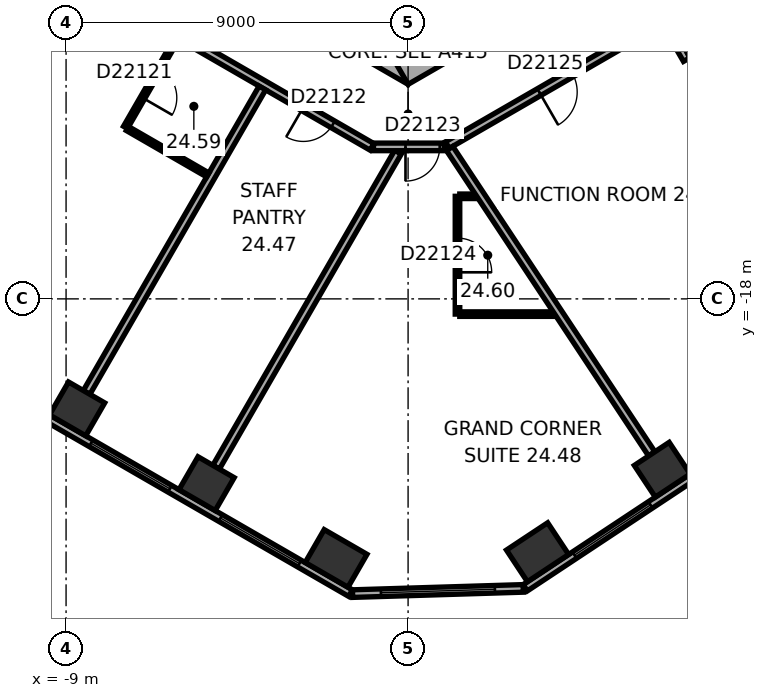
"""IFC4 building model, lengths in metres.
Left out: names, types, materials, properties, quantities, classifications, styles, units other than length and angle.
Written with IfcOpenShell. Run it as: python <this file> out.ifc"""

import sys

from ifc_helpers import new_model, si_unit, direction, frame, frame_2d, origin, origin_2d, place, context, subcontext, project, spatial, rectangle, extrude, element, fill, save


model = new_model("IFC4")
c1 = context("Model", 3, precision=1e-05, world=origin(), true_north=direction((0.0, 1.0)))
c2 = subcontext(c1, "Body", "Model", "MODEL_VIEW")
j1 = project(units=[si_unit("LENGTHUNIT", "METRE"), si_unit("PLANEANGLEUNIT", "RADIAN")], contexts=[c1])
p1 = place(None, origin())
s1 = spatial("IfcSite", under=j1, at=p1, CompositionType="ELEMENT")
p2 = place(p1, origin())
s2 = spatial("IfcBuilding", under=s1, at=p2, CompositionType="ELEMENT")
p3 = place(p2, frame((0.0, 0.0, 103.4)))
s3 = spatial("IfcBuildingStorey", under=s2, at=p3, CompositionType="ELEMENT", Elevation=103.4)
for number, where, z_axis, x_axis in (
    (1, (-8.71, -20.895, 0.0), (0.0, 0.0, 1.0), (0.866, -0.5, 0.0)),
    (2, (-5.302, -22.862, 0.0), (0.0, 0.0, 1.0), (0.866, -0.5, 0.0)),
):
    element("IfcColumn", number, at=place(p3, frame(where, z_axis=z_axis, x_axis=x_axis)), inside=s3, PredefinedType="COLUMN", context=c2, shape_type="SweptSolid", body=[
        extrude(rectangle(XDim=1.1, YDim=1.0, at=origin_2d()), origin(), (0.0, 0.0, 1.0), 3.3),
    ])
for number, where, z_axis, x_axis in (
    (3, (-1.895, -24.829, 0.0), (0.0, 0.0, 1.0), (0.866, -0.5, 0.0)),
    (4, (3.407, -24.667, 0.0), (0.0, 0.0, 1.0), (0.834, 0.552, 0.0)),
):
    element("IfcColumn", number, at=place(p3, frame(where, z_axis=z_axis, x_axis=x_axis)), inside=s3, PredefinedType="COLUMN", context=c2, shape_type="SweptSolid", body=[
        extrude(rectangle(XDim=1.3, YDim=1.0, at=origin_2d()), origin(), (0.0, 0.0, 1.0), 3.3),
    ])
p4 = place(p3, frame((6.688, -22.496, 0.0), z_axis=(0.0, 0.0, 1.0), x_axis=(0.833885822067, 0.551936985312, 0.0)))
e5 = element("IfcColumn", 5, at=p4, inside=s3, PredefinedType="COLUMN", context=c2, shape_type="SweptSolid", body=[
    extrude(rectangle(XDim=1.1, YDim=1.0, at=origin_2d()), origin(), (0.0, 0.0, 1.0), 3.3),
])
p5 = place(p3, frame((-10.4, -5.658, 0.0), z_axis=(0.0, 0.0, 1.0), x_axis=(0.866021384402, -0.500006961711, 0.0)))
e6 = element("IfcWall", 6, at=p5, inside=s3, PredefinedType="SHEAR", context=c2, shape_type="SweptSolid", body=[
    extrude(rectangle(XDim=12.355, YDim=1.2, at=frame_2d((6.178, 0.0))), origin(), (0.0, 0.0, 1.0), 3.3),
])
p6 = place(p5, frame((6.378, 0.0, 0.0)))
e7 = element("IfcOpeningElement", 7, at=p6, cuts=e6, PredefinedType="OPENING", context=c2, shape_type="SweptSolid", body=[
    extrude(rectangle(XDim=1.5, YDim=2.1, at=frame_2d((0.75, 1.05))), frame((0.0, 0.61, 0.0), z_axis=(0.0, -1.0, 0.0), x_axis=(1.0, 0.0, 0.0)), (0.0, 0.0, 1.0), 1.22),
])
p7 = place(p5, frame((1.928, 0.0, 0.0)))
e8 = element("IfcOpeningElement", 8, at=p7, cuts=e6, PredefinedType="OPENING", context=c2, shape_type="SweptSolid", body=[
    extrude(rectangle(XDim=0.9, YDim=2.1, at=frame_2d((0.45, 1.05))), frame((0.0, 0.61, 0.0), z_axis=(0.0, -1.0, 0.0), x_axis=(1.0, 0.0, 0.0)), (0.0, 0.0, 1.0), 1.22),
])
p8 = place(p5, frame((4.528, 0.0, 0.0)))
e9 = element("IfcOpeningElement", 9, at=p8, cuts=e6, PredefinedType="OPENING", context=c2, shape_type="SweptSolid", body=[
    extrude(rectangle(XDim=0.9, YDim=2.1, at=frame_2d((0.45, 1.05))), frame((0.0, 0.61, 0.0), z_axis=(0.0, -1.0, 0.0), x_axis=(1.0, 0.0, 0.0)), (0.0, 0.0, 1.0), 1.22),
])
p9 = place(p3, frame((-0.3, -11.836, 0.0), z_axis=(0.0, 0.0, 1.0), x_axis=(0.866021384402, 0.500006961711, 0.0)))
e10 = element("IfcWall", 10, at=p9, inside=s3, PredefinedType="SHEAR", context=c2, shape_type="SweptSolid", body=[
    extrude(rectangle(XDim=12.355, YDim=1.2, at=frame_2d((6.178, 0.0))), origin(), (0.0, 0.0, 1.0), 3.3),
])
p10 = place(p9, frame((4.128, 0.0, 0.0)))
e11 = element("IfcOpeningElement", 11, at=p10, cuts=e10, PredefinedType="OPENING", context=c2, shape_type="SweptSolid", body=[
    extrude(rectangle(XDim=0.9, YDim=2.1, at=frame_2d((0.45, 1.05))), frame((0.0, 0.61, 0.0), z_axis=(0.0, -1.0, 0.0), x_axis=(1.0, 0.0, 0.0)), (0.0, 0.0, 1.0), 1.22),
])
p11 = place(p9, frame((7.928, 0.0, 0.0)))
e12 = element("IfcOpeningElement", 12, at=p11, cuts=e10, PredefinedType="OPENING", context=c2, shape_type="SweptSolid", body=[
    extrude(rectangle(XDim=1.1, YDim=2.1, at=frame_2d((0.55, 1.05))), frame((0.0, 0.61, 0.0), z_axis=(0.0, -1.0, 0.0), x_axis=(1.0, 0.0, 0.0)), (0.0, 0.0, 1.0), 1.22),
])
p12 = place(p3, frame((-19.914, -15.119, 0.0), z_axis=(0.0, 0.0, 1.0), x_axis=(0.866025418898, -0.499999973822, 0.0)))
e13 = element("IfcWall", 13, at=p12, inside=s3, PredefinedType="STANDARD", context=c2, shape_type="SweptSolid", body=[
    extrude(rectangle(XDim=21.246, YDim=0.2, at=frame_2d((10.623, 0.0))), origin(), (0.0, 0.0, 1.0), 3.3),
])
p13 = place(p12, frame((1.555, 0.0, 0.8)))
e14 = element("IfcOpeningElement", 14, at=p13, cuts=e13, PredefinedType="OPENING", context=c2, shape_type="SweptSolid", body=[
    extrude(rectangle(XDim=2.4, YDim=1.7, at=frame_2d((1.2, 0.85))), frame((0.0, 0.11, 0.0), z_axis=(0.0, -1.0, 0.0), x_axis=(1.0, 0.0, 0.0)), (0.0, 0.0, 1.0), 0.22),
])
p14 = place(p12, frame((5.489, 0.0, 0.8)))
e15 = element("IfcOpeningElement", 15, at=p14, cuts=e13, PredefinedType="OPENING", context=c2, shape_type="SweptSolid", body=[
    extrude(rectangle(XDim=2.4, YDim=1.7, at=frame_2d((1.2, 0.85))), frame((0.0, 0.11, 0.0), z_axis=(0.0, -1.0, 0.0), x_axis=(1.0, 0.0, 0.0)), (0.0, 0.0, 1.0), 0.22),
])
p15 = place(p12, frame((9.424, 0.0, 0.8)))
e16 = element("IfcOpeningElement", 16, at=p15, cuts=e13, PredefinedType="OPENING", context=c2, shape_type="SweptSolid", body=[
    extrude(rectangle(XDim=2.4, YDim=1.7, at=frame_2d((1.2, 0.85))), frame((0.0, 0.11, 0.0), z_axis=(0.0, -1.0, 0.0), x_axis=(1.0, 0.0, 0.0)), (0.0, 0.0, 1.0), 0.22),
])
p16 = place(p12, frame((13.358, 0.0, 0.8)))
e17 = element("IfcOpeningElement", 17, at=p16, cuts=e13, PredefinedType="OPENING", context=c2, shape_type="SweptSolid", body=[
    extrude(rectangle(XDim=2.4, YDim=1.7, at=frame_2d((1.2, 0.85))), frame((0.0, 0.11, 0.0), z_axis=(0.0, -1.0, 0.0), x_axis=(1.0, 0.0, 0.0)), (0.0, 0.0, 1.0), 0.22),
])
p17 = place(p12, frame((17.293, 0.0, 0.8)))
e18 = element("IfcOpeningElement", 18, at=p17, cuts=e13, PredefinedType="OPENING", context=c2, shape_type="SweptSolid", body=[
    extrude(rectangle(XDim=2.4, YDim=1.7, at=frame_2d((1.2, 0.85))), frame((0.0, 0.11, 0.0), z_axis=(0.0, -1.0, 0.0), x_axis=(1.0, 0.0, 0.0)), (0.0, 0.0, 1.0), 0.22),
])
p18 = place(p3, frame((-1.461, -25.755, 0.0), z_axis=(0.0, 0.0, 1.0), x_axis=(0.999533823446, 0.030530898895, 0.0)))
e19 = element("IfcWall", 19, at=p18, inside=s3, PredefinedType="STANDARD", context=c2, shape_type="SweptSolid", body=[
    extrude(rectangle(XDim=4.494, YDim=0.2, at=frame_2d((2.247, 0.0))), origin(), (0.0, 0.0, 1.0), 3.3),
])
p19 = place(p18, frame((0.747, 0.0, 0.8)))
e20 = element("IfcOpeningElement", 20, at=p19, cuts=e19, PredefinedType="OPENING", context=c2, shape_type="SweptSolid", body=[
    extrude(rectangle(XDim=3.0, YDim=1.7, at=frame_2d((1.5, 0.85))), frame((0.0, 0.11, 0.0), z_axis=(0.0, -1.0, 0.0), x_axis=(1.0, 0.0, 0.0)), (0.0, 0.0, 1.0), 0.22),
])
p20 = place(p3, frame((3.083, -25.601, 0.0), z_axis=(0.0, 0.0, 1.0), x_axis=(0.833884295743, 0.551939291329, 0.0)))
e21 = element("IfcWall", 21, at=p20, inside=s3, PredefinedType="STANDARD", context=c2, shape_type="SweptSolid", body=[
    extrude(rectangle(XDim=21.246, YDim=0.2, at=frame_2d((10.623, 0.0))), origin(), (0.0, 0.0, 1.0), 3.3),
])
p21 = place(p20, frame((1.553, 0.0, 0.8)))
e22 = element("IfcOpeningElement", 22, at=p21, cuts=e21, PredefinedType="OPENING", context=c2, shape_type="SweptSolid", body=[
    extrude(rectangle(XDim=2.4, YDim=1.7, at=frame_2d((1.2, 0.85))), frame((0.0, 0.11, 0.0), z_axis=(0.0, -1.0, 0.0), x_axis=(1.0, 0.0, 0.0)), (0.0, 0.0, 1.0), 0.22),
])
p22 = place(p20, frame((5.488, 0.0, 0.8)))
e23 = element("IfcOpeningElement", 23, at=p22, cuts=e21, PredefinedType="OPENING", context=c2, shape_type="SweptSolid", body=[
    extrude(rectangle(XDim=2.4, YDim=1.7, at=frame_2d((1.2, 0.85))), frame((0.0, 0.11, 0.0), z_axis=(0.0, -1.0, 0.0), x_axis=(1.0, 0.0, 0.0)), (0.0, 0.0, 1.0), 0.22),
])
p23 = place(p20, frame((9.422, 0.0, 0.8)))
e24 = element("IfcOpeningElement", 24, at=p23, cuts=e21, PredefinedType="OPENING", context=c2, shape_type="SweptSolid", body=[
    extrude(rectangle(XDim=2.4, YDim=1.7, at=frame_2d((1.2, 0.85))), frame((0.0, 0.11, 0.0), z_axis=(0.0, -1.0, 0.0), x_axis=(1.0, 0.0, 0.0)), (0.0, 0.0, 1.0), 0.22),
])
p24 = place(p20, frame((13.357, 0.0, 0.8)))
e25 = element("IfcOpeningElement", 25, at=p24, cuts=e21, PredefinedType="OPENING", context=c2, shape_type="SweptSolid", body=[
    extrude(rectangle(XDim=2.4, YDim=1.7, at=frame_2d((1.2, 0.85))), frame((0.0, 0.11, 0.0), z_axis=(0.0, -1.0, 0.0), x_axis=(1.0, 0.0, 0.0)), (0.0, 0.0, 1.0), 0.22),
])
p25 = place(p20, frame((17.291, 0.0, 0.8)))
e26 = element("IfcOpeningElement", 26, at=p25, cuts=e21, PredefinedType="OPENING", context=c2, shape_type="SweptSolid", body=[
    extrude(rectangle(XDim=2.4, YDim=1.7, at=frame_2d((1.2, 0.85))), frame((0.0, 0.11, 0.0), z_axis=(0.0, -1.0, 0.0), x_axis=(1.0, 0.0, 0.0)), (0.0, 0.0, 1.0), 0.22),
])
p26 = place(p3, frame((-11.615, -7.843, 0.0), z_axis=(0.0, 0.0, 1.0), x_axis=(0.866026466995, -0.499998158461, 0.0)))
e27 = element("IfcWall", 27, at=p26, inside=s3, PredefinedType="PARTITIONING", context=c2, shape_type="SweptSolid", body=[
    extrude(rectangle(XDim=12.315, YDim=0.2, at=frame_2d((6.158, 0.0))), origin(), (0.0, 0.0, 1.0), 3.05),
])
p27 = place(p26, frame((3.333, 0.0, 0.0)))
e28 = element("IfcOpeningElement", 28, at=p27, cuts=e27, PredefinedType="OPENING", context=c2, shape_type="SweptSolid", body=[
    extrude(rectangle(XDim=0.9, YDim=2.1, at=frame_2d((0.45, 1.05))), frame((0.0, 0.11, 0.0), z_axis=(0.0, -1.0, 0.0), x_axis=(1.0, 0.0, 0.0)), (0.0, 0.0, 1.0), 0.22),
])
p28 = place(p26, frame((10.229, 0.0, 0.0)))
e29 = element("IfcOpeningElement", 29, at=p28, cuts=e27, PredefinedType="OPENING", context=c2, shape_type="SweptSolid", body=[
    extrude(rectangle(XDim=0.9, YDim=2.1, at=frame_2d((0.45, 1.05))), frame((0.0, 0.11, 0.0), z_axis=(0.0, -1.0, 0.0), x_axis=(1.0, 0.0, 0.0)), (0.0, 0.0, 1.0), 0.22),
])
p29 = place(p3, frame((-8.46, -20.461, 0.0), z_axis=(0.0, 0.0, 1.0), x_axis=(0.499999662836, 0.866025598446, 0.0)))
e30 = element("IfcWall", 30, at=p29, inside=s3, PredefinedType="PARTITIONING", context=c2, shape_type="SweptSolid", body=[
    extrude(rectangle(XDim=9.25, YDim=0.2, at=frame_2d((4.625, 0.0))), origin(), (0.0, 0.0, 1.0), 3.05),
])
p30 = place(p3, frame((-7.436, -13.489, 0.0), z_axis=(0.0, 0.0, 1.0), x_axis=(0.500048589285, 0.86599734893, 0.0)))
e31 = element("IfcWall", 31, at=p30, inside=s3, PredefinedType="PARTITIONING", context=c2, shape_type="SweptSolid", body=[
    extrude(rectangle(XDim=2.7, YDim=0.12, at=frame_2d((1.35, 0.0))), origin(), (0.0, 0.0, 1.0), 3.05),
])
p31 = place(p30, frame((0.9, 0.0, 0.0)))
e32 = element("IfcOpeningElement", 32, at=p31, cuts=e31, PredefinedType="OPENING", context=c2, shape_type="SweptSolid", body=[
    extrude(rectangle(XDim=0.9, YDim=2.1, at=frame_2d((0.45, 1.05))), frame((0.0, 0.07, 0.0), z_axis=(0.0, -1.0, 0.0), x_axis=(1.0, 0.0, 0.0)), (0.0, 0.0, 1.0), 0.14),
])
p32 = place(p3, frame((-5.271, -14.739, 0.0), z_axis=(0.0, 0.0, 1.0), x_axis=(-0.866023955769, 0.500002508028, 0.0)))
e33 = element("IfcWall", 33, at=p32, inside=s3, PredefinedType="PARTITIONING", context=c2, shape_type="SweptSolid", body=[
    extrude(rectangle(XDim=2.44, YDim=0.12, at=frame_2d((1.22, 0.0))), origin(), (0.0, 0.0, 1.0), 3.05),
])
p33 = place(p3, frame((-5.052, -22.429, 0.0), z_axis=(0.0, 0.0, 1.0), x_axis=(0.500004329283, 0.866022904257, 0.0)))
e34 = element("IfcWall", 34, at=p33, inside=s3, PredefinedType="PARTITIONING", context=c2, shape_type="SweptSolid", body=[
    extrude(rectangle(XDim=9.572, YDim=0.2, at=frame_2d((4.786, 0.0))), origin(), (0.0, 0.0, 1.0), 3.05),
])
p34 = place(p3, frame((-0.91, -14.001, 0.0), z_axis=(0.0, 0.0, 1.0), x_axis=(1.0, 0.0, 0.0)))
e35 = element("IfcWall", 35, at=p34, inside=s3, PredefinedType="PARTITIONING", context=c2, shape_type="SweptSolid", body=[
    extrude(rectangle(XDim=1.86, YDim=0.2, at=frame_2d((0.93, 0.0))), origin(), (0.0, 0.0, 1.0), 3.05),
])
p35 = place(p34, frame((0.842, 0.0, 0.0)))
e36 = element("IfcOpeningElement", 36, at=p35, cuts=e35, PredefinedType="OPENING", context=c2, shape_type="SweptSolid", body=[
    extrude(rectangle(XDim=0.9, YDim=2.1, at=frame_2d((0.45, 1.05))), frame((0.0, 0.11, 0.0), z_axis=(0.0, -1.0, 0.0), x_axis=(1.0, 0.0, 0.0)), (0.0, 0.0, 1.0), 0.22),
])
p36 = place(p3, frame((1.033, -13.953, 0.0), z_axis=(0.0, 0.0, 1.0), x_axis=(0.866017531406, 0.500013635111, 0.0)))
e37 = element("IfcWall", 37, at=p36, inside=s3, PredefinedType="PARTITIONING", context=c2, shape_type="SweptSolid", body=[
    extrude(rectangle(XDim=6.58, YDim=0.2, at=frame_2d((3.29, 0.0))), origin(), (0.0, 0.0, 1.0), 3.05),
])
p37 = place(p36, frame((2.79, 0.0, 0.0)))
e38 = element("IfcOpeningElement", 38, at=p37, cuts=e37, PredefinedType="OPENING", context=c2, shape_type="SweptSolid", body=[
    extrude(rectangle(XDim=1.0, YDim=2.1, at=frame_2d((0.5, 1.05))), frame((0.0, 0.11, 0.0), z_axis=(0.0, -1.0, 0.0), x_axis=(1.0, 0.0, 0.0)), (0.0, 0.0, 1.0), 0.22),
])
p38 = place(p3, frame((1.3, -18.401, 0.0), z_axis=(0.0, 0.0, 1.0), x_axis=(0.0, 1.0, 0.0)))
e39 = element("IfcWall", 39, at=p38, inside=s3, PredefinedType="PARTITIONING", context=c2, shape_type="SweptSolid", body=[
    extrude(rectangle(XDim=3.1, YDim=0.12, at=frame_2d((1.55, 0.0))), origin(), (0.0, 0.0, 1.0), 3.05),
])
p39 = place(p38, frame((1.1, 0.0, 0.0)))
e40 = element("IfcOpeningElement", 40, at=p39, cuts=e39, PredefinedType="OPENING", context=c2, shape_type="SweptSolid", body=[
    extrude(rectangle(XDim=0.9, YDim=2.1, at=frame_2d((0.45, 1.05))), frame((0.0, 0.07, 0.0), z_axis=(0.0, -1.0, 0.0), x_axis=(1.0, 0.0, 0.0)), (0.0, 0.0, 1.0), 0.14),
])
p40 = place(p3, frame((1.36, -15.301, 0.0), z_axis=(0.0, 0.0, 1.0), x_axis=(1.0, 0.0, 0.0)))
e41 = element("IfcWall", 41, at=p40, inside=s3, PredefinedType="PARTITIONING", context=c2, shape_type="SweptSolid", body=[
    extrude(rectangle(XDim=0.416, YDim=0.12, at=frame_2d((0.208, 0.0))), origin(), (0.0, 0.0, 1.0), 3.05),
])
p41 = place(p3, frame((3.828, -18.401, 0.0), z_axis=(0.0, 0.0, 1.0), x_axis=(-1.0, 0.0, 0.0)))
e42 = element("IfcWall", 42, at=p41, inside=s3, PredefinedType="PARTITIONING", context=c2, shape_type="SweptSolid", body=[
    extrude(rectangle(XDim=2.468, YDim=0.12, at=frame_2d((1.234, 0.0))), origin(), (0.0, 0.0, 1.0), 3.05),
])
p42 = place(p3, frame((6.412, -22.079, 0.0), z_axis=(0.0, 0.0, 1.0), x_axis=(-0.551919507115, 0.83389739037, 0.0)))
e43 = element("IfcWall", 43, at=p42, inside=s3, PredefinedType="PARTITIONING", context=c2, shape_type="SweptSolid", body=[
    extrude(rectangle(XDim=9.635, YDim=0.2, at=frame_2d((4.817, 0.0))), origin(), (0.0, 0.0, 1.0), 3.05),
])
p43 = place(p3, frame((6.782, -10.749, 0.0), z_axis=(0.0, 0.0, 1.0), x_axis=(0.500074377092, -0.865982457891, 0.0)))
e44 = element("IfcWall", 44, at=p43, inside=s3, PredefinedType="PARTITIONING", context=c2, shape_type="SweptSolid", body=[
    extrude(rectangle(XDim=1.101, YDim=0.2, at=frame_2d((0.55, 0.0))), origin(), (0.0, 0.0, 1.0), 3.05),
])
p44 = place(p16, origin())
e45 = element("IfcWindow", 45, at=p44, inside=s3, PartitioningType="SINGLE_PANEL", PredefinedType="WINDOW", context=c2, shape_type="SweptSolid", body=[
    extrude(rectangle(XDim=2.4, YDim=1.7, at=frame_2d((1.2, 0.85))), frame((0.0, 0.03, 0.0), z_axis=(0.0, -1.0, 0.0), x_axis=(1.0, 0.0, 0.0)), (0.0, 0.0, 1.0), 0.06),
])
fill(e17, e45)
p45 = place(p17, origin())
e46 = element("IfcWindow", 46, at=p45, inside=s3, PartitioningType="SINGLE_PANEL", PredefinedType="WINDOW", context=c2, shape_type="SweptSolid", body=[
    extrude(rectangle(XDim=2.4, YDim=1.7, at=frame_2d((1.2, 0.85))), frame((0.0, 0.03, 0.0), z_axis=(0.0, -1.0, 0.0), x_axis=(1.0, 0.0, 0.0)), (0.0, 0.0, 1.0), 0.06),
])
fill(e18, e46)
p46 = place(p19, origin())
e47 = element("IfcWindow", 47, at=p46, inside=s3, PartitioningType="SINGLE_PANEL", PredefinedType="WINDOW", context=c2, shape_type="SweptSolid", body=[
    extrude(rectangle(XDim=3.0, YDim=1.7, at=frame_2d((1.5, 0.85))), frame((0.0, 0.03, 0.0), z_axis=(0.0, -1.0, 0.0), x_axis=(1.0, 0.0, 0.0)), (0.0, 0.0, 1.0), 0.06),
])
fill(e20, e47)
p47 = place(p21, origin())
e48 = element("IfcWindow", 48, at=p47, inside=s3, PartitioningType="SINGLE_PANEL", PredefinedType="WINDOW", context=c2, shape_type="SweptSolid", body=[
    extrude(rectangle(XDim=2.4, YDim=1.7, at=frame_2d((1.2, 0.85))), frame((0.0, 0.03, 0.0), z_axis=(0.0, -1.0, 0.0), x_axis=(1.0, 0.0, 0.0)), (0.0, 0.0, 1.0), 0.06),
])
fill(e22, e48)
p48 = place(p31, origin())
e49 = element("IfcDoor", 49, at=p48, inside=s3, OperationType="SINGLE_SWING_LEFT", PredefinedType="DOOR", context=c2, shape_type="SweptSolid", body=[
    extrude(rectangle(XDim=0.9, YDim=2.1, at=frame_2d((0.45, 1.05))), frame((0.0, 0.025, 0.0), z_axis=(0.0, -1.0, 0.0), x_axis=(1.0, 0.0, 0.0)), (0.0, 0.0, 1.0), 0.05),
])
fill(e32, e49)
p49 = place(p28, origin())
e50 = element("IfcDoor", 50, at=p49, inside=s3, OperationType="SINGLE_SWING_LEFT", PredefinedType="DOOR", context=c2, shape_type="SweptSolid", body=[
    extrude(rectangle(XDim=0.9, YDim=2.1, at=frame_2d((0.45, 1.05))), frame((0.0, 0.025, 0.0), z_axis=(0.0, -1.0, 0.0), x_axis=(1.0, 0.0, 0.0)), (0.0, 0.0, 1.0), 0.05),
])
fill(e29, e50)
p50 = place(p35, origin())
e51 = element("IfcDoor", 51, at=p50, inside=s3, OperationType="SINGLE_SWING_LEFT", PredefinedType="DOOR", context=c2, shape_type="SweptSolid", body=[
    extrude(rectangle(XDim=0.9, YDim=2.1, at=frame_2d((0.45, 1.05))), frame((0.0, 0.025, 0.0), z_axis=(0.0, -1.0, 0.0), x_axis=(1.0, 0.0, 0.0)), (0.0, 0.0, 1.0), 0.05),
])
fill(e36, e51)
p51 = place(p39, origin())
e52 = element("IfcDoor", 52, at=p51, inside=s3, OperationType="SINGLE_SWING_LEFT", PredefinedType="DOOR", context=c2, shape_type="SweptSolid", body=[
    extrude(rectangle(XDim=0.9, YDim=2.1, at=frame_2d((0.45, 1.05))), frame((0.0, 0.025, 0.0), z_axis=(0.0, -1.0, 0.0), x_axis=(1.0, 0.0, 0.0)), (0.0, 0.0, 1.0), 0.05),
])
fill(e40, e52)
p52 = place(p37, origin())
e53 = element("IfcDoor", 53, at=p52, inside=s3, OperationType="SINGLE_SWING_LEFT", PredefinedType="DOOR", context=c2, shape_type="SweptSolid", body=[
    extrude(rectangle(XDim=1.0, YDim=2.1, at=frame_2d((0.5, 1.05))), frame((0.0, 0.025, 0.0), z_axis=(0.0, -1.0, 0.0), x_axis=(1.0, 0.0, 0.0)), (0.0, 0.0, 1.0), 0.05),
])
fill(e38, e53)
save(model, sys.argv[1])
